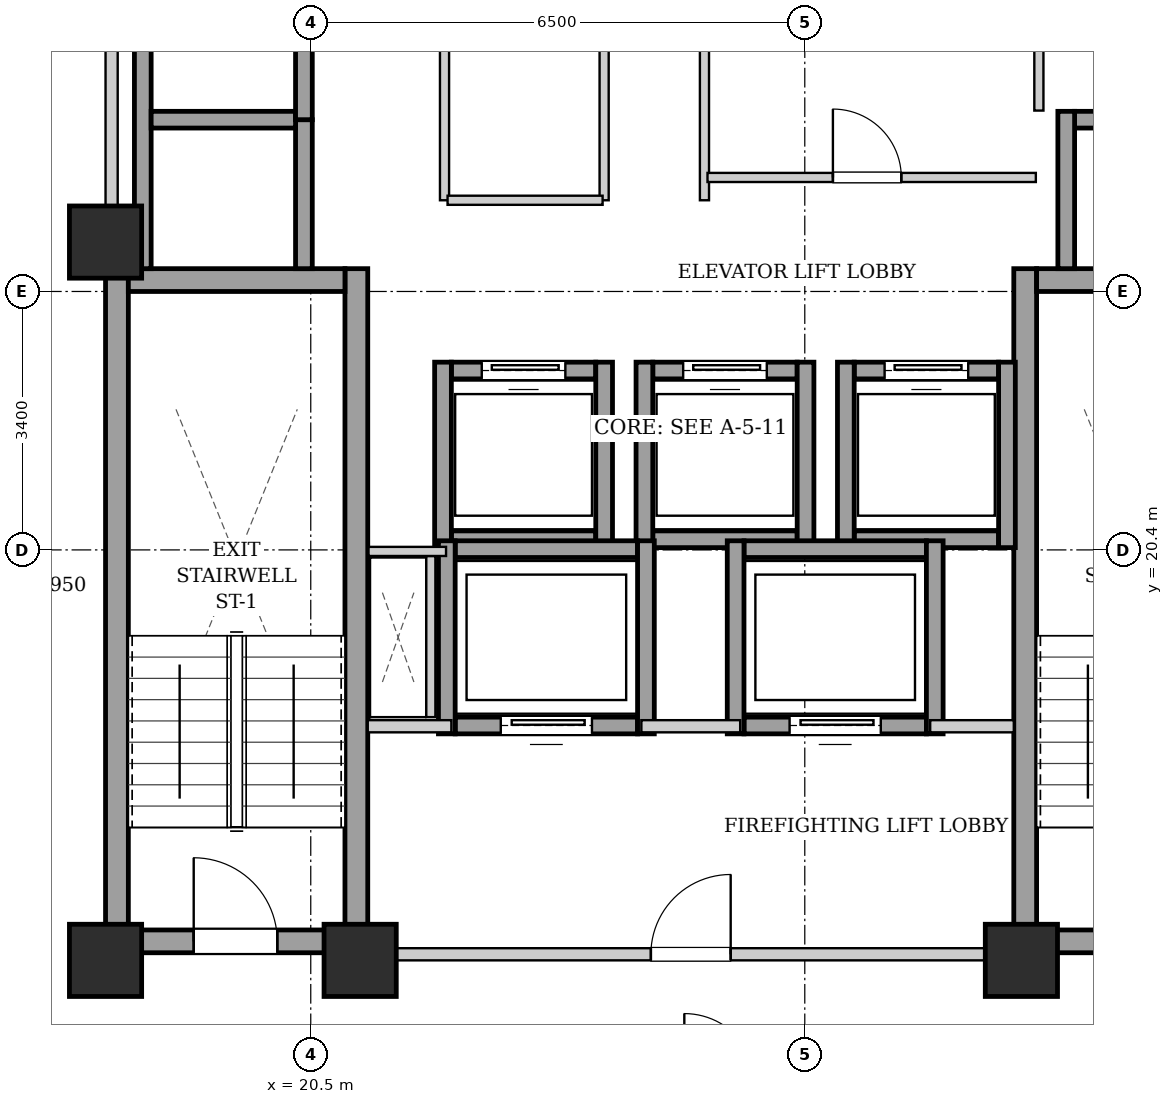
"""IFC4 building model, lengths in metres.
Left out: names, types, materials, properties, quantities, classifications, styles, units other than length and angle.
Written with IfcOpenShell. Run it as: python <this file> out.ifc"""

import sys

from ifc_helpers import new_model, si_unit, direction, frame, frame_2d, origin, origin_2d, place, context, subcontext, project, spatial, rectangle, extrude, element, fill, save


model = new_model("IFC4")
c1 = context("Model", 3, precision=1e-05, world=origin(), true_north=direction((0.0, 1.0)))
c2 = subcontext(c1, "Body", "Model", "MODEL_VIEW")
j1 = project(units=[si_unit("LENGTHUNIT", "METRE"), si_unit("PLANEANGLEUNIT", "RADIAN")], contexts=[c1])
p1 = place(None, origin())
s1 = spatial("IfcSite", under=j1, at=p1, CompositionType="ELEMENT")
p2 = place(p1, origin())
s2 = spatial("IfcBuilding", under=s1, at=p2, CompositionType="ELEMENT")
p3 = place(p2, frame((0.0, 0.0, 160.15)))
s3 = spatial("IfcBuildingStorey", under=s2, at=p3, CompositionType="ELEMENT", Elevation=160.15)
for number, where, z_axis, x_axis in (
    (1, (17.8, 15.0, 0.0), (0.0, 0.0, 1.0), (1.0, 0.0, 0.0)),
    (2, (21.15, 15.0, 0.0), (0.0, 0.0, 1.0), (1.0, 0.0, 0.0)),
    (3, (29.85, 15.0, 0.0), (0.0, 0.0, 1.0), (1.0, 0.0, 0.0)),
    (4, (17.8, 24.45, 0.0), (0.0, 0.0, 1.0), (1.0, 0.0, 0.0)),
):
    element("IfcColumn", number, at=place(p3, frame(where, z_axis=z_axis, x_axis=x_axis)), inside=s3, PredefinedType="COLUMN", context=c2, shape_type="SweptSolid", body=[
        extrude(rectangle(XDim=0.95, YDim=0.95, at=origin_2d()), origin(), (0.0, 0.0, 1.0), 3.25),
    ])
for number, where, z_axis, x_axis in (
    (5, (17.95, 15.1, 0.0), (0.0, 0.0, 1.0), (0.0, 1.0, 0.0)),
    (6, (21.1, 15.1, 0.0), (0.0, 0.0, 1.0), (0.0, 1.0, 0.0)),
):
    element("IfcWall", number, at=place(p3, frame(where, z_axis=z_axis, x_axis=x_axis)), inside=s3, PredefinedType="SHEAR", context=c2, shape_type="SweptSolid", body=[
        extrude(rectangle(XDim=9.0, YDim=0.3, at=frame_2d((4.5, 0.0))), origin(), (0.0, 0.0, 1.0), 2.99),
    ])
p4 = place(p3, frame((18.1, 23.95, 0.0), z_axis=(0.0, 0.0, 1.0), x_axis=(1.0, 0.0, 0.0)))
e7 = element("IfcWall", 7, at=p4, inside=s3, PredefinedType="SHEAR", context=c2, shape_type="SweptSolid", body=[
    extrude(rectangle(XDim=2.85, YDim=0.3, at=frame_2d((1.425, 0.0))), origin(), (0.0, 0.0, 1.0), 2.99),
])
p5 = place(p3, frame((18.1, 15.25, 0.0), z_axis=(0.0, 0.0, 1.0), x_axis=(1.0, 0.0, 0.0)))
e8 = element("IfcWall", 8, at=p5, inside=s3, PredefinedType="SHEAR", context=c2, shape_type="SweptSolid", body=[
    extrude(rectangle(XDim=2.85, YDim=0.3, at=frame_2d((1.425, 0.0))), origin(), (0.0, 0.0, 1.0), 2.99),
])
p6 = place(p5, frame((0.86, 0.0, 0.0)))
e9 = element("IfcOpeningElement", 9, at=p6, cuts=e8, PredefinedType="OPENING", context=c2, shape_type="SweptSolid", body=[
    extrude(rectangle(XDim=1.1, YDim=2.05, at=frame_2d((0.55, 1.025))), frame((0.0, 0.16, 0.0), z_axis=(0.0, -1.0, 0.0), x_axis=(1.0, 0.0, 0.0)), (0.0, 0.0, 1.0), 0.32),
])
p7 = place(p3, frame((29.9, 15.1, 0.0), z_axis=(0.0, 0.0, 1.0), x_axis=(0.0, 1.0, 0.0)))
e10 = element("IfcWall", 10, at=p7, inside=s3, PredefinedType="SHEAR", context=c2, shape_type="SweptSolid", body=[
    extrude(rectangle(XDim=9.0, YDim=0.3, at=frame_2d((4.5, 0.0))), origin(), (0.0, 0.0, 1.0), 2.99),
])
p8 = place(p3, frame((30.05, 23.95, 0.0), z_axis=(0.0, 0.0, 1.0), x_axis=(1.0, 0.0, 0.0)))
e11 = element("IfcWall", 11, at=p8, inside=s3, PredefinedType="SHEAR", context=c2, shape_type="SweptSolid", body=[
    extrude(rectangle(XDim=2.85, YDim=0.3, at=frame_2d((1.425, 0.0))), origin(), (0.0, 0.0, 1.0), 2.99),
])
p9 = place(p3, frame((30.05, 15.25, 0.0), z_axis=(0.0, 0.0, 1.0), x_axis=(1.0, 0.0, 0.0)))
e12 = element("IfcWall", 12, at=p9, inside=s3, PredefinedType="SHEAR", context=c2, shape_type="SweptSolid", body=[
    extrude(rectangle(XDim=2.85, YDim=0.3, at=frame_2d((1.425, 0.0))), origin(), (0.0, 0.0, 1.0), 2.99),
])
p10 = place(p9, frame((0.86, 0.0, 0.0)))
e13 = element("IfcOpeningElement", 13, at=p10, cuts=e12, PredefinedType="OPENING", context=c2, shape_type="SweptSolid", body=[
    extrude(rectangle(XDim=1.1, YDim=2.05, at=frame_2d((0.55, 1.025))), frame((0.0, 0.16, 0.0), z_axis=(0.0, -1.0, 0.0), x_axis=(1.0, 0.0, 0.0)), (0.0, 0.0, 1.0), 0.32),
])
p11 = place(p3, frame((22.35, 20.54, 0.0), z_axis=(0.0, 0.0, 1.0), x_axis=(1.0, 0.0, 0.0)))
e14 = element("IfcWall", 14, at=p11, inside=s3, PredefinedType="SHEAR", context=c2, shape_type="SweptSolid", body=[
    extrude(rectangle(XDim=1.9, YDim=0.22, at=frame_2d((0.95, 0.0))), origin(), (0.0, 0.0, 1.0), 2.99),
])
p12 = place(p3, frame((22.35, 22.76, 0.0), z_axis=(0.0, 0.0, 1.0), x_axis=(1.0, 0.0, 0.0)))
e15 = element("IfcWall", 15, at=p12, inside=s3, PredefinedType="SHEAR", context=c2, shape_type="SweptSolid", body=[
    extrude(rectangle(XDim=1.9, YDim=0.22, at=frame_2d((0.95, 0.0))), origin(), (0.0, 0.0, 1.0), 2.99),
])
p13 = place(p12, frame((0.4, 0.0, 0.0)))
e16 = element("IfcOpeningElement", 16, at=p13, cuts=e15, PredefinedType="OPENING", context=c2, shape_type="SweptSolid", body=[
    extrude(rectangle(XDim=1.1, YDim=2.15, at=frame_2d((0.55, 1.075))), frame((0.0, 0.12, 0.0), z_axis=(0.0, -1.0, 0.0), x_axis=(1.0, 0.0, 0.0)), (0.0, 0.0, 1.0), 0.24),
])
for number, where, z_axis, x_axis in (
    (17, (22.24, 20.43, 0.0), (0.0, 0.0, 1.0), (0.0, 1.0, 0.0)),
    (18, (24.36, 20.43, 0.0), (0.0, 0.0, 1.0), (0.0, 1.0, 0.0)),
):
    element("IfcWall", number, at=place(p3, frame(where, z_axis=z_axis, x_axis=x_axis)), inside=s3, PredefinedType="SHEAR", context=c2, shape_type="SweptSolid", body=[
        extrude(rectangle(XDim=2.44, YDim=0.22, at=frame_2d((1.22, 0.0))), origin(), (0.0, 0.0, 1.0), 2.99),
    ])
p14 = place(p3, frame((25.0, 20.54, 0.0), z_axis=(0.0, 0.0, 1.0), x_axis=(1.0, 0.0, 0.0)))
e19 = element("IfcWall", 19, at=p14, inside=s3, PredefinedType="SHEAR", context=c2, shape_type="SweptSolid", body=[
    extrude(rectangle(XDim=1.9, YDim=0.22, at=frame_2d((0.95, 0.0))), origin(), (0.0, 0.0, 1.0), 2.99),
])
p15 = place(p3, frame((25.0, 22.76, 0.0), z_axis=(0.0, 0.0, 1.0), x_axis=(1.0, 0.0, 0.0)))
e20 = element("IfcWall", 20, at=p15, inside=s3, PredefinedType="SHEAR", context=c2, shape_type="SweptSolid", body=[
    extrude(rectangle(XDim=1.9, YDim=0.22, at=frame_2d((0.95, 0.0))), origin(), (0.0, 0.0, 1.0), 2.99),
])
p16 = place(p15, frame((0.4, 0.0, 0.0)))
e21 = element("IfcOpeningElement", 21, at=p16, cuts=e20, PredefinedType="OPENING", context=c2, shape_type="SweptSolid", body=[
    extrude(rectangle(XDim=1.1, YDim=2.15, at=frame_2d((0.55, 1.075))), frame((0.0, 0.12, 0.0), z_axis=(0.0, -1.0, 0.0), x_axis=(1.0, 0.0, 0.0)), (0.0, 0.0, 1.0), 0.24),
])
for number, where, z_axis, x_axis in (
    (22, (24.89, 20.43, 0.0), (0.0, 0.0, 1.0), (0.0, 1.0, 0.0)),
    (23, (27.01, 20.43, 0.0), (0.0, 0.0, 1.0), (0.0, 1.0, 0.0)),
):
    element("IfcWall", number, at=place(p3, frame(where, z_axis=z_axis, x_axis=x_axis)), inside=s3, PredefinedType="SHEAR", context=c2, shape_type="SweptSolid", body=[
        extrude(rectangle(XDim=2.44, YDim=0.22, at=frame_2d((1.22, 0.0))), origin(), (0.0, 0.0, 1.0), 2.99),
    ])
p17 = place(p3, frame((27.65, 20.54, 0.0), z_axis=(0.0, 0.0, 1.0), x_axis=(1.0, 0.0, 0.0)))
e24 = element("IfcWall", 24, at=p17, inside=s3, PredefinedType="SHEAR", context=c2, shape_type="SweptSolid", body=[
    extrude(rectangle(XDim=1.9, YDim=0.22, at=frame_2d((0.95, 0.0))), origin(), (0.0, 0.0, 1.0), 2.99),
])
p18 = place(p3, frame((27.65, 22.76, 0.0), z_axis=(0.0, 0.0, 1.0), x_axis=(1.0, 0.0, 0.0)))
e25 = element("IfcWall", 25, at=p18, inside=s3, PredefinedType="SHEAR", context=c2, shape_type="SweptSolid", body=[
    extrude(rectangle(XDim=1.9, YDim=0.22, at=frame_2d((0.95, 0.0))), origin(), (0.0, 0.0, 1.0), 2.99),
])
p19 = place(p18, frame((0.4, 0.0, 0.0)))
e26 = element("IfcOpeningElement", 26, at=p19, cuts=e25, PredefinedType="OPENING", context=c2, shape_type="SweptSolid", body=[
    extrude(rectangle(XDim=1.1, YDim=2.15, at=frame_2d((0.55, 1.075))), frame((0.0, 0.12, 0.0), z_axis=(0.0, -1.0, 0.0), x_axis=(1.0, 0.0, 0.0)), (0.0, 0.0, 1.0), 0.24),
])
for number, where, z_axis, x_axis in (
    (27, (27.54, 20.43, 0.0), (0.0, 0.0, 1.0), (0.0, 1.0, 0.0)),
    (28, (29.66, 20.43, 0.0), (0.0, 0.0, 1.0), (0.0, 1.0, 0.0)),
):
    element("IfcWall", number, at=place(p3, frame(where, z_axis=z_axis, x_axis=x_axis)), inside=s3, PredefinedType="SHEAR", context=c2, shape_type="SweptSolid", body=[
        extrude(rectangle(XDim=2.44, YDim=0.22, at=frame_2d((1.22, 0.0))), origin(), (0.0, 0.0, 1.0), 2.99),
    ])
p20 = place(p3, frame((18.29, 24.1, 0.0), z_axis=(0.0, 0.0, 1.0), x_axis=(0.0, 1.0, 0.0)))
e29 = element("IfcWall", 29, at=p20, inside=s3, PredefinedType="SHEAR", context=c2, shape_type="SweptSolid", body=[
    extrude(rectangle(XDim=4.14, YDim=0.22, at=frame_2d((2.07, 0.0))), origin(), (0.0, 0.0, 1.0), 2.99),
])
p21 = place(p3, frame((20.41, 24.1, 0.0), z_axis=(0.0, 0.0, 1.0), x_axis=(0.0, 1.0, 0.0)))
e30 = element("IfcWall", 30, at=p21, inside=s3, PredefinedType="SHEAR", context=c2, shape_type="SweptSolid", body=[
    extrude(rectangle(XDim=1.96, YDim=0.22, at=frame_2d((0.98, 0.0))), origin(), (0.0, 0.0, 1.0), 2.99),
])
p22 = place(p3, frame((18.4, 26.06, 0.0), z_axis=(0.0, 0.0, 1.0), x_axis=(1.0, 0.0, 0.0)))
e31 = element("IfcWall", 31, at=p22, inside=s3, PredefinedType="SHEAR", context=c2, shape_type="SweptSolid", body=[
    extrude(rectangle(XDim=1.9, YDim=0.22, at=frame_2d((0.95, 0.0))), origin(), (0.0, 0.0, 1.0), 2.99),
])
p23 = place(p3, frame((20.41, 26.06, 0.0), z_axis=(0.0, 0.0, 1.0), x_axis=(0.0, 1.0, 0.0)))
e32 = element("IfcWall", 32, at=p23, inside=s3, PredefinedType="SHEAR", context=c2, shape_type="SweptSolid", body=[
    extrude(rectangle(XDim=2.18, YDim=0.22, at=frame_2d((1.09, 0.0))), origin(), (0.0, 0.0, 1.0), 2.99),
])
p24 = place(p3, frame((30.55, 26.06, 0.0), z_axis=(0.0, 0.0, 1.0), x_axis=(1.0, 0.0, 0.0)))
e33 = element("IfcWall", 33, at=p24, inside=s3, PredefinedType="SHEAR", context=c2, shape_type="SweptSolid", body=[
    extrude(rectangle(XDim=1.9, YDim=0.22, at=frame_2d((0.95, 0.0))), origin(), (0.0, 0.0, 1.0), 2.99),
])
p25 = place(p3, frame((30.44, 24.1, 0.0), z_axis=(0.0, 0.0, 1.0), x_axis=(0.0, 1.0, 0.0)))
e34 = element("IfcWall", 34, at=p25, inside=s3, PredefinedType="SHEAR", context=c2, shape_type="SweptSolid", body=[
    extrude(rectangle(XDim=2.07, YDim=0.22, at=frame_2d((1.035, 0.0))), origin(), (0.0, 0.0, 1.0), 2.99),
])
p26 = place(p3, frame((22.4, 18.09, 0.0), z_axis=(0.0, 0.0, 1.0), x_axis=(1.0, 0.0, 0.0)))
e35 = element("IfcWall", 35, at=p26, inside=s3, PredefinedType="SHEAR", context=c2, shape_type="SweptSolid", body=[
    extrude(rectangle(XDim=2.4, YDim=0.22, at=frame_2d((1.2, 0.0))), origin(), (0.0, 0.0, 1.0), 2.99),
])
p27 = place(p26, frame((0.6, 0.0, 0.0)))
e36 = element("IfcOpeningElement", 36, at=p27, cuts=e35, PredefinedType="OPENING", context=c2, shape_type="SweptSolid", body=[
    extrude(rectangle(XDim=1.2, YDim=2.15, at=frame_2d((0.6, 1.075))), frame((0.0, 0.12, 0.0), z_axis=(0.0, -1.0, 0.0), x_axis=(1.0, 0.0, 0.0)), (0.0, 0.0, 1.0), 0.24),
])
p28 = place(p3, frame((22.4, 20.41, 0.0), z_axis=(0.0, 0.0, 1.0), x_axis=(1.0, 0.0, 0.0)))
e37 = element("IfcWall", 37, at=p28, inside=s3, PredefinedType="SHEAR", context=c2, shape_type="SweptSolid", body=[
    extrude(rectangle(XDim=2.4, YDim=0.22, at=frame_2d((1.2, 0.0))), origin(), (0.0, 0.0, 1.0), 2.99),
])
for number, where, z_axis, x_axis in (
    (38, (22.29, 17.98, 0.0), (0.0, 0.0, 1.0), (0.0, 1.0, 0.0)),
    (39, (24.91, 17.98, 0.0), (0.0, 0.0, 1.0), (0.0, 1.0, 0.0)),
):
    element("IfcWall", number, at=place(p3, frame(where, z_axis=z_axis, x_axis=x_axis)), inside=s3, PredefinedType="SHEAR", context=c2, shape_type="SweptSolid", body=[
        extrude(rectangle(XDim=2.54, YDim=0.22, at=frame_2d((1.27, 0.0))), origin(), (0.0, 0.0, 1.0), 2.99),
    ])
p29 = place(p3, frame((26.2, 18.09, 0.0), z_axis=(0.0, 0.0, 1.0), x_axis=(1.0, 0.0, 0.0)))
e40 = element("IfcWall", 40, at=p29, inside=s3, PredefinedType="SHEAR", context=c2, shape_type="SweptSolid", body=[
    extrude(rectangle(XDim=2.4, YDim=0.22, at=frame_2d((1.2, 0.0))), origin(), (0.0, 0.0, 1.0), 2.99),
])
p30 = place(p29, frame((0.6, 0.0, 0.0)))
e41 = element("IfcOpeningElement", 41, at=p30, cuts=e40, PredefinedType="OPENING", context=c2, shape_type="SweptSolid", body=[
    extrude(rectangle(XDim=1.2, YDim=2.15, at=frame_2d((0.6, 1.075))), frame((0.0, 0.12, 0.0), z_axis=(0.0, -1.0, 0.0), x_axis=(1.0, 0.0, 0.0)), (0.0, 0.0, 1.0), 0.24),
])
p31 = place(p3, frame((26.2, 20.41, 0.0), z_axis=(0.0, 0.0, 1.0), x_axis=(1.0, 0.0, 0.0)))
e42 = element("IfcWall", 42, at=p31, inside=s3, PredefinedType="SHEAR", context=c2, shape_type="SweptSolid", body=[
    extrude(rectangle(XDim=2.4, YDim=0.22, at=frame_2d((1.2, 0.0))), origin(), (0.0, 0.0, 1.0), 2.99),
])
for number, where, z_axis, x_axis in (
    (43, (26.09, 17.98, 0.0), (0.0, 0.0, 1.0), (0.0, 1.0, 0.0)),
    (44, (28.71, 17.98, 0.0), (0.0, 0.0, 1.0), (0.0, 1.0, 0.0)),
):
    element("IfcWall", number, at=place(p3, frame(where, z_axis=z_axis, x_axis=x_axis)), inside=s3, PredefinedType="SHEAR", context=c2, shape_type="SweptSolid", body=[
        extrude(rectangle(XDim=2.54, YDim=0.22, at=frame_2d((1.27, 0.0))), origin(), (0.0, 0.0, 1.0), 2.99),
    ])
p32 = place(p3, frame((21.25, 15.08, 0.0), z_axis=(0.0, 0.0, 1.0), x_axis=(1.0, 0.0, 0.0)))
e45 = element("IfcWall", 45, at=p32, inside=s3, PredefinedType="PARTITIONING", context=c2, shape_type="SweptSolid", body=[
    extrude(rectangle(XDim=8.5, YDim=0.16, at=frame_2d((4.25, 0.0))), origin(), (0.0, 0.0, 1.0), 2.442),
])
p33 = place(p32, frame((3.725, 0.0, 0.0)))
e46 = element("IfcOpeningElement", 46, at=p33, cuts=e45, PredefinedType="OPENING", context=c2, shape_type="SweptSolid", body=[
    extrude(rectangle(XDim=1.05, YDim=2.05, at=frame_2d((0.525, 1.025))), frame((0.0, 0.09, 0.0), z_axis=(0.0, -1.0, 0.0), x_axis=(1.0, 0.0, 0.0)), (0.0, 0.0, 1.0), 0.18),
])
p34 = place(p3, frame((21.25, 18.08, 0.0), z_axis=(0.0, 0.0, 1.0), x_axis=(1.0, 0.0, 0.0)))
e47 = element("IfcWall", 47, at=p34, inside=s3, PredefinedType="PARTITIONING", context=c2, shape_type="SweptSolid", body=[
    extrude(rectangle(XDim=1.1, YDim=0.16, at=frame_2d((0.55, 0.0))), origin(), (0.0, 0.0, 1.0), 2.99),
])
p35 = place(p3, frame((24.85, 18.08, 0.0), z_axis=(0.0, 0.0, 1.0), x_axis=(1.0, 0.0, 0.0)))
e48 = element("IfcWall", 48, at=p35, inside=s3, PredefinedType="PARTITIONING", context=c2, shape_type="SweptSolid", body=[
    extrude(rectangle(XDim=1.3, YDim=0.16, at=frame_2d((0.65, 0.0))), origin(), (0.0, 0.0, 1.0), 2.99),
])
p36 = place(p3, frame((28.65, 18.08, 0.0), z_axis=(0.0, 0.0, 1.0), x_axis=(1.0, 0.0, 0.0)))
e49 = element("IfcWall", 49, at=p36, inside=s3, PredefinedType="PARTITIONING", context=c2, shape_type="SweptSolid", body=[
    extrude(rectangle(XDim=1.1, YDim=0.16, at=frame_2d((0.55, 0.0))), origin(), (0.0, 0.0, 1.0), 2.99),
])
p37 = place(p3, frame((17.88, 24.12, 0.0), z_axis=(0.0, 0.0, 1.0), x_axis=(0.0, 1.0, 0.0)))
e50 = element("IfcWall", 50, at=p37, inside=s3, PredefinedType="PARTITIONING", context=c2, shape_type="SweptSolid", body=[
    extrude(rectangle(XDim=4.76, YDim=0.16, at=frame_2d((2.38, 0.0))), origin(), (0.0, 0.0, 1.0), 2.99),
])
p38 = place(p3, frame((22.08, 18.2, 0.0), z_axis=(0.0, 0.0, 1.0), x_axis=(0.0, 1.0, 0.0)))
e51 = element("IfcWall", 51, at=p38, inside=s3, PredefinedType="PARTITIONING", context=c2, shape_type="SweptSolid", body=[
    extrude(rectangle(XDim=2.12, YDim=0.12, at=frame_2d((1.06, 0.0))), origin(), (0.0, 0.0, 1.0), 2.99),
])
p39 = place(p3, frame((22.28, 20.38, 0.0), z_axis=(0.0, 0.0, 1.0), x_axis=(-1.0, 0.0, 0.0)))
e52 = element("IfcWall", 52, at=p39, inside=s3, PredefinedType="PARTITIONING", context=c2, shape_type="SweptSolid", body=[
    extrude(rectangle(XDim=1.02, YDim=0.12, at=frame_2d((0.51, 0.0))), origin(), (0.0, 0.0, 1.0), 2.99),
])
for number, where, z_axis, x_axis in (
    (53, (24.36, 25.0, 0.0), (0.0, 0.0, 1.0), (0.0, 1.0, 0.0)),
    (54, (25.68, 25.0, 0.0), (0.0, 0.0, 1.0), (0.0, 1.0, 0.0)),
):
    element("IfcWall", number, at=place(p3, frame(where, z_axis=z_axis, x_axis=x_axis)), inside=s3, PredefinedType="PARTITIONING", context=c2, shape_type="SweptSolid", body=[
        extrude(rectangle(XDim=3.87, YDim=0.12, at=frame_2d((1.935, 0.0))), origin(), (0.0, 0.0, 1.0), 2.99),
    ])
p40 = place(p3, frame((30.08, 26.18, 0.0), z_axis=(0.0, 0.0, 1.0), x_axis=(0.0, 1.0, 0.0)))
e55 = element("IfcWall", 55, at=p40, inside=s3, PredefinedType="PARTITIONING", context=c2, shape_type="SweptSolid", body=[
    extrude(rectangle(XDim=1.28, YDim=0.12, at=frame_2d((0.64, 0.0))), origin(), (0.0, 0.0, 1.0), 2.99),
])
p41 = place(p3, frame((22.26, 25.0, 0.0), z_axis=(0.0, 0.0, 1.0), x_axis=(0.0, 1.0, 0.0)))
e56 = element("IfcWall", 56, at=p41, inside=s3, PredefinedType="PARTITIONING", context=c2, shape_type="SweptSolid", body=[
    extrude(rectangle(XDim=3.86, YDim=0.12, at=frame_2d((1.93, 0.0))), origin(), (0.0, 0.0, 1.0), 2.99),
])
p42 = place(p3, frame((22.3, 25.0, 0.0), z_axis=(0.0, 0.0, 1.0), x_axis=(1.0, 0.0, 0.0)))
e57 = element("IfcWall", 57, at=p42, inside=s3, PredefinedType="PARTITIONING", context=c2, shape_type="SweptSolid", body=[
    extrude(rectangle(XDim=2.04, YDim=0.12, at=frame_2d((1.02, 0.0))), origin(), (0.0, 0.0, 1.0), 2.99),
])
p43 = place(p3, frame((25.72, 25.3, 0.0), z_axis=(0.0, 0.0, 1.0), x_axis=(1.0, 0.0, 0.0)))
e58 = element("IfcWall", 58, at=p43, inside=s3, PredefinedType="PARTITIONING", context=c2, shape_type="SweptSolid", body=[
    extrude(rectangle(XDim=4.32, YDim=0.12, at=frame_2d((2.16, 0.0))), origin(), (0.0, 0.0, 1.0), 2.99),
])
p44 = place(p43, frame((1.65, 0.0, 0.0)))
e59 = element("IfcOpeningElement", 59, at=p44, cuts=e58, PredefinedType="OPENING", context=c2, shape_type="SweptSolid", body=[
    extrude(rectangle(XDim=0.9, YDim=2.05, at=frame_2d((0.45, 1.025))), frame((0.0, 0.07, 0.0), z_axis=(0.0, -1.0, 0.0), x_axis=(1.0, 0.0, 0.0)), (0.0, 0.0, 1.0), 0.14),
])
p45 = place(p6, origin())
e60 = element("IfcDoor", 60, at=p45, inside=s3, OperationType="SINGLE_SWING_LEFT", PredefinedType="DOOR", context=c2, shape_type="SweptSolid", body=[
    extrude(rectangle(XDim=1.1, YDim=2.05, at=frame_2d((0.55, 1.025))), frame((0.0, 0.025, 0.0), z_axis=(0.0, -1.0, 0.0), x_axis=(1.0, 0.0, 0.0)), (0.0, 0.0, 1.0), 0.05),
])
fill(e9, e60)
p46 = place(p13, origin())
e61 = element("IfcDoor", 61, at=p46, inside=s3, OperationType="SLIDING_TO_LEFT", PredefinedType="DOOR", context=c2, shape_type="SweptSolid", body=[
    extrude(rectangle(XDim=1.1, YDim=2.15, at=frame_2d((0.55, 1.075))), frame((0.0, 0.025, 0.0), z_axis=(0.0, -1.0, 0.0), x_axis=(1.0, 0.0, 0.0)), (0.0, 0.0, 1.0), 0.05),
])
fill(e16, e61)
p47 = place(p16, origin())
e62 = element("IfcDoor", 62, at=p47, inside=s3, OperationType="SLIDING_TO_LEFT", PredefinedType="DOOR", context=c2, shape_type="SweptSolid", body=[
    extrude(rectangle(XDim=1.1, YDim=2.15, at=frame_2d((0.55, 1.075))), frame((0.0, 0.025, 0.0), z_axis=(0.0, -1.0, 0.0), x_axis=(1.0, 0.0, 0.0)), (0.0, 0.0, 1.0), 0.05),
])
fill(e21, e62)
p48 = place(p19, origin())
e63 = element("IfcDoor", 63, at=p48, inside=s3, OperationType="SLIDING_TO_LEFT", PredefinedType="DOOR", context=c2, shape_type="SweptSolid", body=[
    extrude(rectangle(XDim=1.1, YDim=2.15, at=frame_2d((0.55, 1.075))), frame((0.0, 0.025, 0.0), z_axis=(0.0, -1.0, 0.0), x_axis=(1.0, 0.0, 0.0)), (0.0, 0.0, 1.0), 0.05),
])
fill(e26, e63)
p49 = place(p27, origin())
e64 = element("IfcDoor", 64, at=p49, inside=s3, OperationType="SLIDING_TO_LEFT", PredefinedType="DOOR", context=c2, shape_type="SweptSolid", body=[
    extrude(rectangle(XDim=1.2, YDim=2.15, at=frame_2d((0.6, 1.075))), frame((0.0, 0.025, 0.0), z_axis=(0.0, -1.0, 0.0), x_axis=(1.0, 0.0, 0.0)), (0.0, 0.0, 1.0), 0.05),
])
fill(e36, e64)
p50 = place(p30, origin())
e65 = element("IfcDoor", 65, at=p50, inside=s3, OperationType="SLIDING_TO_LEFT", PredefinedType="DOOR", context=c2, shape_type="SweptSolid", body=[
    extrude(rectangle(XDim=1.2, YDim=2.15, at=frame_2d((0.6, 1.075))), frame((0.0, 0.025, 0.0), z_axis=(0.0, -1.0, 0.0), x_axis=(1.0, 0.0, 0.0)), (0.0, 0.0, 1.0), 0.05),
])
fill(e41, e65)
p51 = place(p33, origin())
e66 = element("IfcDoor", 66, at=p51, inside=s3, OperationType="SINGLE_SWING_RIGHT", PredefinedType="DOOR", context=c2, shape_type="SweptSolid", body=[
    extrude(rectangle(XDim=1.05, YDim=2.05, at=frame_2d((0.525, 1.025))), frame((0.0, 0.025, 0.0), z_axis=(0.0, -1.0, 0.0), x_axis=(1.0, 0.0, 0.0)), (0.0, 0.0, 1.0), 0.05),
])
fill(e46, e66)
p52 = place(p44, origin())
e67 = element("IfcDoor", 67, at=p52, inside=s3, OperationType="SINGLE_SWING_LEFT", PredefinedType="DOOR", context=c2, shape_type="SweptSolid", body=[
    extrude(rectangle(XDim=0.9, YDim=2.05, at=frame_2d((0.45, 1.025))), frame((0.0, 0.025, 0.0), z_axis=(0.0, -1.0, 0.0), x_axis=(1.0, 0.0, 0.0)), (0.0, 0.0, 1.0), 0.05),
])
fill(e59, e67)
save(model, sys.argv[1])
